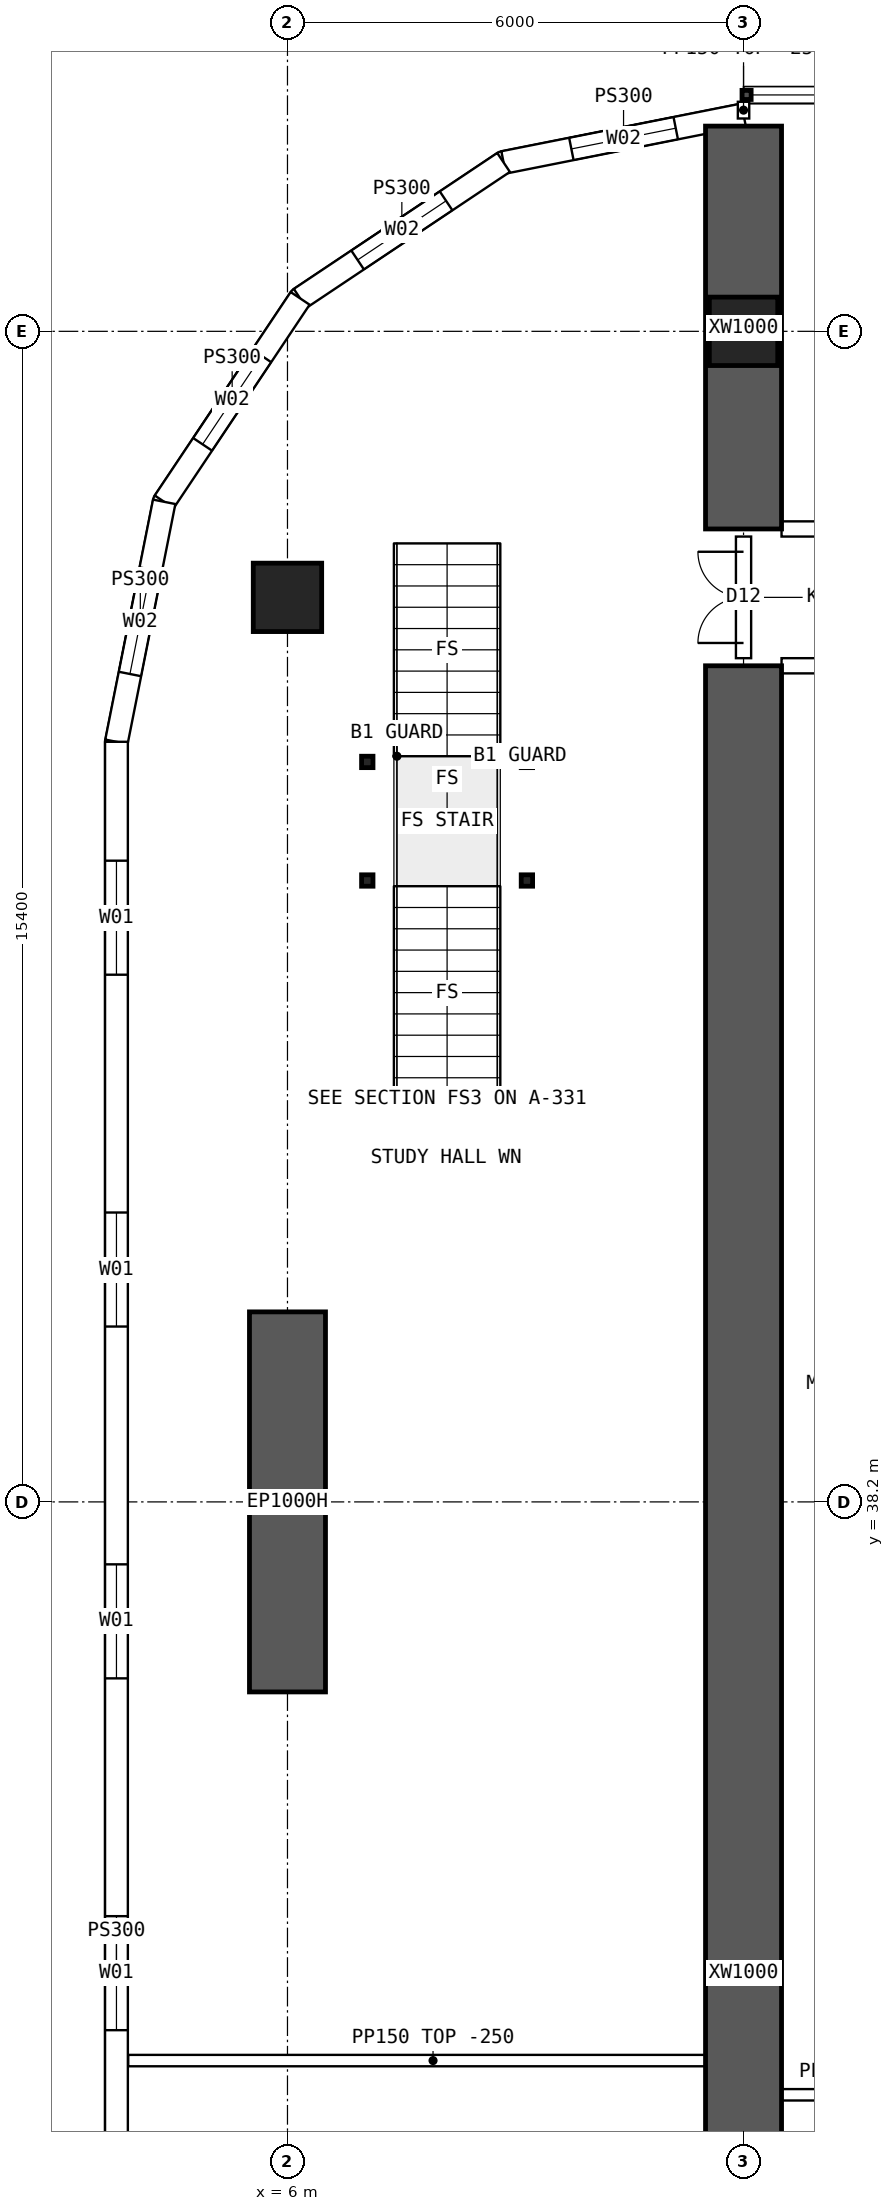
"""IFC4 building model, lengths in metres.
Left out: names, types, materials, properties, quantities, classifications, styles, units other than length and angle.
Written with IfcOpenShell. Run it as: python <this file> out.ifc"""

import sys

from ifc_helpers import new_model, si_unit, direction, frame, frame_2d, origin, origin_2d, place, context, subcontext, project, spatial, polyline, rectangle, hollow_rectangle, outline, extrude, element, fill, save


model = new_model("IFC4")
c1 = context("Model", 3, precision=1e-05, world=origin(), true_north=direction((0.0, 1.0)))
c2 = subcontext(c1, "Body", "Model", "MODEL_VIEW")
j1 = project(units=[si_unit("LENGTHUNIT", "METRE"), si_unit("PLANEANGLEUNIT", "RADIAN")], contexts=[c1])
p1 = place(None, origin())
s1 = spatial("IfcSite", under=j1, at=p1, CompositionType="ELEMENT")
p2 = place(p1, origin())
s2 = spatial("IfcBuilding", under=s1, at=p2, CompositionType="ELEMENT")
p3 = place(p2, frame((0.0, 0.0, 53.95)))
s3 = spatial("IfcBuildingStorey", under=s2, at=p3, CompositionType="ELEMENT", Elevation=53.95)
for number, where, z_axis, x_axis in (
    (1, (12.0, 53.6, 0.0), (0.0, 0.0, 1.0), (1.0, 0.0, 0.0)),
    (2, (6.0, 50.1, 0.0), (0.0, 0.0, 1.0), (1.0, 0.0, 0.0)),
):
    element("IfcColumn", number, at=place(p3, frame(where, z_axis=z_axis, x_axis=x_axis)), inside=s3, PredefinedType="COLUMN", context=c2, shape_type="SweptSolid", body=[
        extrude(hollow_rectangle(XDim=0.9, YDim=0.9, WallThickness=0.09, at=origin_2d()), origin(), (0.0, 0.0, 1.0), 3.75),
    ])
p4 = place(p3, frame((6.0, 35.7, 0.0), z_axis=(0.0, 0.0, 1.0), x_axis=(0.0, 1.0, 0.0)))
e3 = element("IfcWall", 3, at=p4, inside=s3, PredefinedType="SHEAR", context=c2, shape_type="SweptSolid", body=[
    extrude(rectangle(XDim=5.0, YDim=1.0, at=frame_2d((2.5, 0.0))), origin(), (0.0, 0.0, 1.0), 3.75),
])
p5 = place(p3, frame((12.0, 51.0, 0.0), z_axis=(0.0, 0.0, 1.0), x_axis=(0.0, 1.0, 0.0)))
e4 = element("IfcWall", 4, at=p5, inside=s3, PredefinedType="SHEAR", context=c2, shape_type="SweptSolid", body=[
    extrude(rectangle(XDim=5.3, YDim=1.0, at=frame_2d((2.65, 0.0))), origin(), (0.0, 0.0, 1.0), 3.75),
])
p6 = place(p3, frame((12.0, 14.8, 0.0), z_axis=(0.0, 0.0, 1.0), x_axis=(0.0, 1.0, 0.0)))
e5 = element("IfcWall", 5, at=p6, inside=s3, PredefinedType="SHEAR", context=c2, shape_type="SweptSolid", body=[
    extrude(rectangle(XDim=34.4, YDim=1.0, at=frame_2d((17.2, 0.0))), origin(), (0.0, 0.0, 1.0), 3.75),
])
p7 = place(p3, frame((3.75, 48.2, 0.0), z_axis=(0.0, 0.0, 1.0), x_axis=(0.0, -1.0, 0.0)))
e6 = element("IfcWall", 6, at=p7, inside=s3, PredefinedType="SOLIDWALL", context=c2, shape_type="SweptSolid", body=[
    extrude(outline(polyline([(-0.015, -0.15), (32.415, -0.15), (32.385, 0.15), (0.015, 0.15), (-0.015, -0.15)])), origin(), (0.0, 0.0, 1.0), 3.5),
])
p8 = place(p7, frame((1.564, 0.0, 0.9)))
e7 = element("IfcOpeningElement", 7, at=p8, cuts=e6, PredefinedType="OPENING", context=c2, shape_type="SweptSolid", body=[
    extrude(rectangle(XDim=1.5, YDim=2.0, at=frame_2d((0.75, 1.0))), frame((0.0, 0.16, 0.0), z_axis=(0.0, -1.0, 0.0), x_axis=(1.0, 0.0, 0.0)), (0.0, 0.0, 1.0), 0.32),
])
p9 = place(p7, frame((6.193, 0.0, 0.9)))
e8 = element("IfcOpeningElement", 8, at=p9, cuts=e6, PredefinedType="OPENING", context=c2, shape_type="SweptSolid", body=[
    extrude(rectangle(XDim=1.5, YDim=2.0, at=frame_2d((0.75, 1.0))), frame((0.0, 0.16, 0.0), z_axis=(0.0, -1.0, 0.0), x_axis=(1.0, 0.0, 0.0)), (0.0, 0.0, 1.0), 0.32),
])
p10 = place(p7, frame((10.822, 0.0, 0.9)))
e9 = element("IfcOpeningElement", 9, at=p10, cuts=e6, PredefinedType="OPENING", context=c2, shape_type="SweptSolid", body=[
    extrude(rectangle(XDim=1.5, YDim=2.0, at=frame_2d((0.75, 1.0))), frame((0.0, 0.16, 0.0), z_axis=(0.0, -1.0, 0.0), x_axis=(1.0, 0.0, 0.0)), (0.0, 0.0, 1.0), 0.32),
])
p11 = place(p7, frame((15.45, 0.0, 0.9)))
e10 = element("IfcOpeningElement", 10, at=p11, cuts=e6, PredefinedType="OPENING", context=c2, shape_type="SweptSolid", body=[
    extrude(rectangle(XDim=1.5, YDim=2.0, at=frame_2d((0.75, 1.0))), frame((0.0, 0.16, 0.0), z_axis=(0.0, -1.0, 0.0), x_axis=(1.0, 0.0, 0.0)), (0.0, 0.0, 1.0), 0.32),
])
p12 = place(p7, frame((20.079, 0.0, 0.9)))
e11 = element("IfcOpeningElement", 11, at=p12, cuts=e6, PredefinedType="OPENING", context=c2, shape_type="SweptSolid", body=[
    extrude(rectangle(XDim=1.5, YDim=2.0, at=frame_2d((0.75, 1.0))), frame((0.0, 0.16, 0.0), z_axis=(0.0, -1.0, 0.0), x_axis=(1.0, 0.0, 0.0)), (0.0, 0.0, 1.0), 0.32),
])
p13 = place(p7, frame((24.707, 0.0, 0.9)))
e12 = element("IfcOpeningElement", 12, at=p13, cuts=e6, PredefinedType="OPENING", context=c2, shape_type="SweptSolid", body=[
    extrude(rectangle(XDim=1.5, YDim=2.0, at=frame_2d((0.75, 1.0))), frame((0.0, 0.16, 0.0), z_axis=(0.0, -1.0, 0.0), x_axis=(1.0, 0.0, 0.0)), (0.0, 0.0, 1.0), 0.32),
])
p14 = place(p7, frame((29.336, 0.0, 0.9)))
e13 = element("IfcOpeningElement", 13, at=p14, cuts=e6, PredefinedType="OPENING", context=c2, shape_type="SweptSolid", body=[
    extrude(rectangle(XDim=1.5, YDim=2.0, at=frame_2d((0.75, 1.0))), frame((0.0, 0.16, 0.0), z_axis=(0.0, -1.0, 0.0), x_axis=(1.0, 0.0, 0.0)), (0.0, 0.0, 1.0), 0.32),
])
p15 = place(p3, frame((12.0, 56.45, 0.0), z_axis=(0.0, 0.0, 1.0), x_axis=(-0.980787251524, -0.195080412259, 0.0)))
e14 = element("IfcWall", 14, at=p15, inside=s3, PredefinedType="SOLIDWALL", context=c2, shape_type="SweptSolid", body=[
    extrude(outline(polyline([(-0.03, -0.15), (3.249, -0.15), (3.189, 0.15), (0.03, 0.15), (-0.03, -0.15)])), origin(), (0.0, 0.0, 1.0), 3.5),
])
p16 = place(p15, frame((0.909, 0.0, 0.9)))
e15 = element("IfcOpeningElement", 15, at=p16, cuts=e14, PredefinedType="OPENING", context=c2, shape_type="SweptSolid", body=[
    extrude(rectangle(XDim=1.4, YDim=1.8, at=frame_2d((0.7, 0.9))), frame((0.0, 0.16, 0.0), z_axis=(0.0, -1.0, 0.0), x_axis=(1.0, 0.0, 0.0)), (0.0, 0.0, 1.0), 0.32),
])
p17 = place(p3, frame((8.843, 55.822, 0.0), z_axis=(0.0, 0.0, 1.0), x_axis=(-0.831478105043, -0.555557522525, 0.0)))
e16 = element("IfcWall", 16, at=p17, inside=s3, PredefinedType="SOLIDWALL", context=c2, shape_type="SweptSolid", body=[
    extrude(outline(polyline([(-0.03, -0.15), (3.249, -0.15), (3.189, 0.15), (0.03, 0.15), (-0.03, -0.15)])), origin(), (0.0, 0.0, 1.0), 3.5),
])
p18 = place(p17, frame((0.909, 0.0, 0.9)))
e17 = element("IfcOpeningElement", 17, at=p18, cuts=e16, PredefinedType="OPENING", context=c2, shape_type="SweptSolid", body=[
    extrude(rectangle(XDim=1.4, YDim=1.8, at=frame_2d((0.7, 0.9))), frame((0.0, 0.16, 0.0), z_axis=(0.0, -1.0, 0.0), x_axis=(1.0, 0.0, 0.0)), (0.0, 0.0, 1.0), 0.32),
])
p19 = place(p3, frame((6.167, 54.034, 0.0), z_axis=(0.0, 0.0, 1.0), x_axis=(-0.555609954424, -0.831443069936, 0.0)))
e18 = element("IfcWall", 18, at=p19, inside=s3, PredefinedType="SOLIDWALL", context=c2, shape_type="SweptSolid", body=[
    extrude(outline(polyline([(-0.03, -0.15), (3.249, -0.15), (3.189, 0.15), (0.03, 0.15), (-0.03, -0.15)])), origin(), (0.0, 0.0, 1.0), 3.5),
])
p20 = place(p19, frame((0.909, 0.0, 0.9)))
e19 = element("IfcOpeningElement", 19, at=p20, cuts=e18, PredefinedType="OPENING", context=c2, shape_type="SweptSolid", body=[
    extrude(rectangle(XDim=1.4, YDim=1.8, at=frame_2d((0.7, 0.9))), frame((0.0, 0.16, 0.0), z_axis=(0.0, -1.0, 0.0), x_axis=(1.0, 0.0, 0.0)), (0.0, 0.0, 1.0), 0.32),
])
p21 = place(p3, frame((4.378, 51.357, 0.0), z_axis=(0.0, 0.0, 1.0), x_axis=(-0.195065901187, -0.980790137692, 0.0)))
e20 = element("IfcWall", 20, at=p21, inside=s3, PredefinedType="SOLIDWALL", context=c2, shape_type="SweptSolid", body=[
    extrude(outline(polyline([(-0.03, -0.15), (3.234, -0.15), (3.204, 0.15), (0.03, 0.15), (-0.03, -0.15)])), origin(), (0.0, 0.0, 1.0), 3.5),
])
p22 = place(p21, frame((0.909, 0.0, 0.9)))
e21 = element("IfcOpeningElement", 21, at=p22, cuts=e20, PredefinedType="OPENING", context=c2, shape_type="SweptSolid", body=[
    extrude(rectangle(XDim=1.4, YDim=1.8, at=frame_2d((0.7, 0.9))), frame((0.0, 0.16, 0.0), z_axis=(0.0, -1.0, 0.0), x_axis=(1.0, 0.0, 0.0)), (0.0, 0.0, 1.0), 0.32),
])
p23 = place(p3, frame((12.5, 51.0, 0.0), z_axis=(0.0, 0.0, 1.0), x_axis=(1.0, 0.0, 0.0)))
e22 = element("IfcWall", 22, at=p23, inside=s3, PredefinedType="SOLIDWALL", context=c2, shape_type="SweptSolid", body=[
    extrude(outline(polyline([(0.0, 0.0), (5.0, 0.0), (5.0, 3.1), (0.0, 3.1), (0.0, 0.0)])), frame((0.0, 0.1, 0.0), z_axis=(0.0, -1.0, 0.0), x_axis=(1.0, 0.0, 0.0)), (0.0, 0.0, 1.0), 0.2),
])
p24 = place(p23, frame((0.6, 0.0, 0.0)))
e23 = element("IfcOpeningElement", 23, at=p24, cuts=e22, PredefinedType="OPENING", context=c2, shape_type="SweptSolid", body=[
    extrude(rectangle(XDim=1.0, YDim=2.1, at=frame_2d((0.5, 1.05))), frame((0.0, 0.11, 0.0), z_axis=(0.0, -1.0, 0.0), x_axis=(1.0, 0.0, 0.0)), (0.0, 0.0, 1.0), 0.22),
])
p25 = place(p3, frame((12.5, 49.2, 0.0), z_axis=(0.0, 0.0, 1.0), x_axis=(1.0, 0.0, 0.0)))
e24 = element("IfcWall", 24, at=p25, inside=s3, PredefinedType="SOLIDWALL", context=c2, shape_type="SweptSolid", body=[
    extrude(rectangle(XDim=5.0, YDim=0.2, at=frame_2d((2.5, 0.0))), origin(), (0.0, 0.0, 1.0), 3.5),
])
p26 = place(p25, frame((3.3, 0.0, 0.0)))
e25 = element("IfcOpeningElement", 25, at=p26, cuts=e24, PredefinedType="OPENING", context=c2, shape_type="SweptSolid", body=[
    extrude(rectangle(XDim=1.6, YDim=2.1, at=frame_2d((0.8, 1.05))), frame((0.0, 0.11, 0.0), z_axis=(0.0, -1.0, 0.0), x_axis=(1.0, 0.0, 0.0)), (0.0, 0.0, 1.0), 0.22),
])
p27 = place(p3, frame((12.0, 30.4, 0.0), z_axis=(0.0, 0.0, 1.0), x_axis=(1.0, 0.0, 0.0)))
e26 = element("IfcWall", 26, at=p27, inside=s3, PredefinedType="PARTITIONING", context=c2, shape_type="SweptSolid", body=[
    extrude(rectangle(XDim=3.6, YDim=0.15, at=frame_2d((1.8, 0.0))), origin(), (0.0, 0.0, 1.0), 3.5),
])
p28 = place(p3, frame((3.905, 30.85, 0.0), z_axis=(0.0, 0.0, 1.0), x_axis=(1.0, 0.0, 0.0)))
e27 = element("IfcWall", 27, at=p28, inside=s3, PredefinedType="PARTITIONING", context=c2, shape_type="SweptSolid", body=[
    extrude(outline(polyline([(0.0, 0.0), (8.02, 0.0), (8.02, 3.5), (2.397, 3.5), (2.395, 3.05), (1.797, 3.05), (1.795, 3.5), (0.0, 3.5), (0.0, 0.0)])), frame((0.0, 0.075, 0.0), z_axis=(0.0, -1.0, 0.0), x_axis=(1.0, 0.0, 0.0)), (0.0, 0.0, 1.0), 0.15),
])
p29 = place(p3, frame((12.0, 49.3, 0.0), z_axis=(0.0, 0.0, 1.0), x_axis=(0.0, 1.0, 0.0)))
e28 = element("IfcWall", 28, at=p29, inside=s3, PredefinedType="SOLIDWALL", context=c2, shape_type="SweptSolid", body=[
    extrude(outline(polyline([(0.0, 0.0), (1.6, 0.0), (1.6, 3.05), (0.0, 3.05), (0.0, 0.0)])), frame((0.0, 0.1, 0.0), z_axis=(0.0, -1.0, 0.0), x_axis=(1.0, 0.0, 0.0)), (0.0, 0.0, 1.0), 0.2),
])
p30 = place(p29, frame((0.2, 0.0, 0.0)))
e29 = element("IfcOpeningElement", 29, at=p30, cuts=e28, PredefinedType="OPENING", context=c2, shape_type="SweptSolid", body=[
    extrude(rectangle(XDim=1.2, YDim=2.1, at=frame_2d((0.6, 1.05))), frame((0.0, 0.11, 0.0), z_axis=(0.0, -1.0, 0.0), x_axis=(1.0, 0.0, 0.0)), (0.0, 0.0, 1.0), 0.22),
])
p31 = place(p3, frame((12.0, 56.4, 0.0), z_axis=(0.0, 0.0, 1.0), x_axis=(0.0, 1.0, 0.0)))
e30 = element("IfcWall", 30, at=p31, inside=s3, PredefinedType="PARTITIONING", context=c2, shape_type="SweptSolid", body=[
    extrude(rectangle(XDim=0.22, YDim=0.15, at=frame_2d((0.11, 0.0))), origin(), (0.0, 0.0, 1.0), 3.5),
])
for number, where, z_axis, x_axis in (
    (31, (7.05, 46.375, 0.0), (0.0, 0.0, 1.0), (1.0, 0.0, 0.0)),
    (32, (9.15, 46.375, 0.0), (0.0, 0.0, 1.0), (1.0, 0.0, 0.0)),
    (33, (7.05, 47.935, 0.0), (0.0, 0.0, 1.0), (1.0, 0.0, 0.0)),
    (34, (9.15, 47.935, 0.0), (0.0, 0.0, 1.0), (1.0, 0.0, 0.0)),
):
    element("IfcColumn", number, at=place(p3, frame(where, z_axis=z_axis, x_axis=x_axis)), inside=s3, PredefinedType="COLUMN", context=c2, shape_type="SweptSolid", body=[
        extrude(hollow_rectangle(XDim=0.15, YDim=0.15, WallThickness=0.008, at=origin_2d()), origin(), (0.0, 0.0, 1.0), 3.5),
    ])
p32 = place(p8, origin())
e35 = element("IfcWindow", 35, at=p32, inside=s3, PartitioningType="SINGLE_PANEL", PredefinedType="WINDOW", context=c2, shape_type="SweptSolid", body=[
    extrude(rectangle(XDim=1.5, YDim=2.0, at=frame_2d((0.75, 1.0))), frame((0.0, 0.03, 0.0), z_axis=(0.0, -1.0, 0.0), x_axis=(1.0, 0.0, 0.0)), (0.0, 0.0, 1.0), 0.06),
])
fill(e7, e35)
p33 = place(p9, origin())
e36 = element("IfcWindow", 36, at=p33, inside=s3, PartitioningType="SINGLE_PANEL", PredefinedType="WINDOW", context=c2, shape_type="SweptSolid", body=[
    extrude(rectangle(XDim=1.5, YDim=2.0, at=frame_2d((0.75, 1.0))), frame((0.0, 0.03, 0.0), z_axis=(0.0, -1.0, 0.0), x_axis=(1.0, 0.0, 0.0)), (0.0, 0.0, 1.0), 0.06),
])
fill(e8, e36)
p34 = place(p10, origin())
e37 = element("IfcWindow", 37, at=p34, inside=s3, PartitioningType="SINGLE_PANEL", PredefinedType="WINDOW", context=c2, shape_type="SweptSolid", body=[
    extrude(rectangle(XDim=1.5, YDim=2.0, at=frame_2d((0.75, 1.0))), frame((0.0, 0.03, 0.0), z_axis=(0.0, -1.0, 0.0), x_axis=(1.0, 0.0, 0.0)), (0.0, 0.0, 1.0), 0.06),
])
fill(e9, e37)
p35 = place(p11, origin())
e38 = element("IfcWindow", 38, at=p35, inside=s3, PartitioningType="SINGLE_PANEL", PredefinedType="WINDOW", context=c2, shape_type="SweptSolid", body=[
    extrude(rectangle(XDim=1.5, YDim=2.0, at=frame_2d((0.75, 1.0))), frame((0.0, 0.03, 0.0), z_axis=(0.0, -1.0, 0.0), x_axis=(1.0, 0.0, 0.0)), (0.0, 0.0, 1.0), 0.06),
])
fill(e10, e38)
p36 = place(p16, origin())
e39 = element("IfcWindow", 39, at=p36, inside=s3, PartitioningType="SINGLE_PANEL", PredefinedType="WINDOW", context=c2, shape_type="SweptSolid", body=[
    extrude(rectangle(XDim=1.4, YDim=1.8, at=frame_2d((0.7, 0.9))), frame((0.0, 0.03, 0.0), z_axis=(0.0, -1.0, 0.0), x_axis=(1.0, 0.0, 0.0)), (0.0, 0.0, 1.0), 0.06),
])
fill(e15, e39)
p37 = place(p18, origin())
e40 = element("IfcWindow", 40, at=p37, inside=s3, PartitioningType="SINGLE_PANEL", PredefinedType="WINDOW", context=c2, shape_type="SweptSolid", body=[
    extrude(rectangle(XDim=1.4, YDim=1.8, at=frame_2d((0.7, 0.9))), frame((0.0, 0.03, 0.0), z_axis=(0.0, -1.0, 0.0), x_axis=(1.0, 0.0, 0.0)), (0.0, 0.0, 1.0), 0.06),
])
fill(e17, e40)
p38 = place(p20, origin())
e41 = element("IfcWindow", 41, at=p38, inside=s3, PartitioningType="SINGLE_PANEL", PredefinedType="WINDOW", context=c2, shape_type="SweptSolid", body=[
    extrude(rectangle(XDim=1.4, YDim=1.8, at=frame_2d((0.7, 0.9))), frame((0.0, 0.03, 0.0), z_axis=(0.0, -1.0, 0.0), x_axis=(1.0, 0.0, 0.0)), (0.0, 0.0, 1.0), 0.06),
])
fill(e19, e41)
p39 = place(p22, origin())
e42 = element("IfcWindow", 42, at=p39, inside=s3, PartitioningType="SINGLE_PANEL", PredefinedType="WINDOW", context=c2, shape_type="SweptSolid", body=[
    extrude(rectangle(XDim=1.4, YDim=1.8, at=frame_2d((0.7, 0.9))), frame((0.0, 0.03, 0.0), z_axis=(0.0, -1.0, 0.0), x_axis=(1.0, 0.0, 0.0)), (0.0, 0.0, 1.0), 0.06),
])
fill(e21, e42)
p40 = place(p30, origin())
e43 = element("IfcDoor", 43, at=p40, inside=s3, OperationType="DOUBLE_DOOR_SINGLE_SWING", PredefinedType="DOOR", context=c2, shape_type="SweptSolid", body=[
    extrude(rectangle(XDim=1.2, YDim=2.1, at=frame_2d((0.6, 1.05))), frame((0.0, 0.025, 0.0), z_axis=(0.0, -1.0, 0.0), x_axis=(1.0, 0.0, 0.0)), (0.0, 0.0, 1.0), 0.05),
])
fill(e29, e43)
save(model, sys.argv[1])
